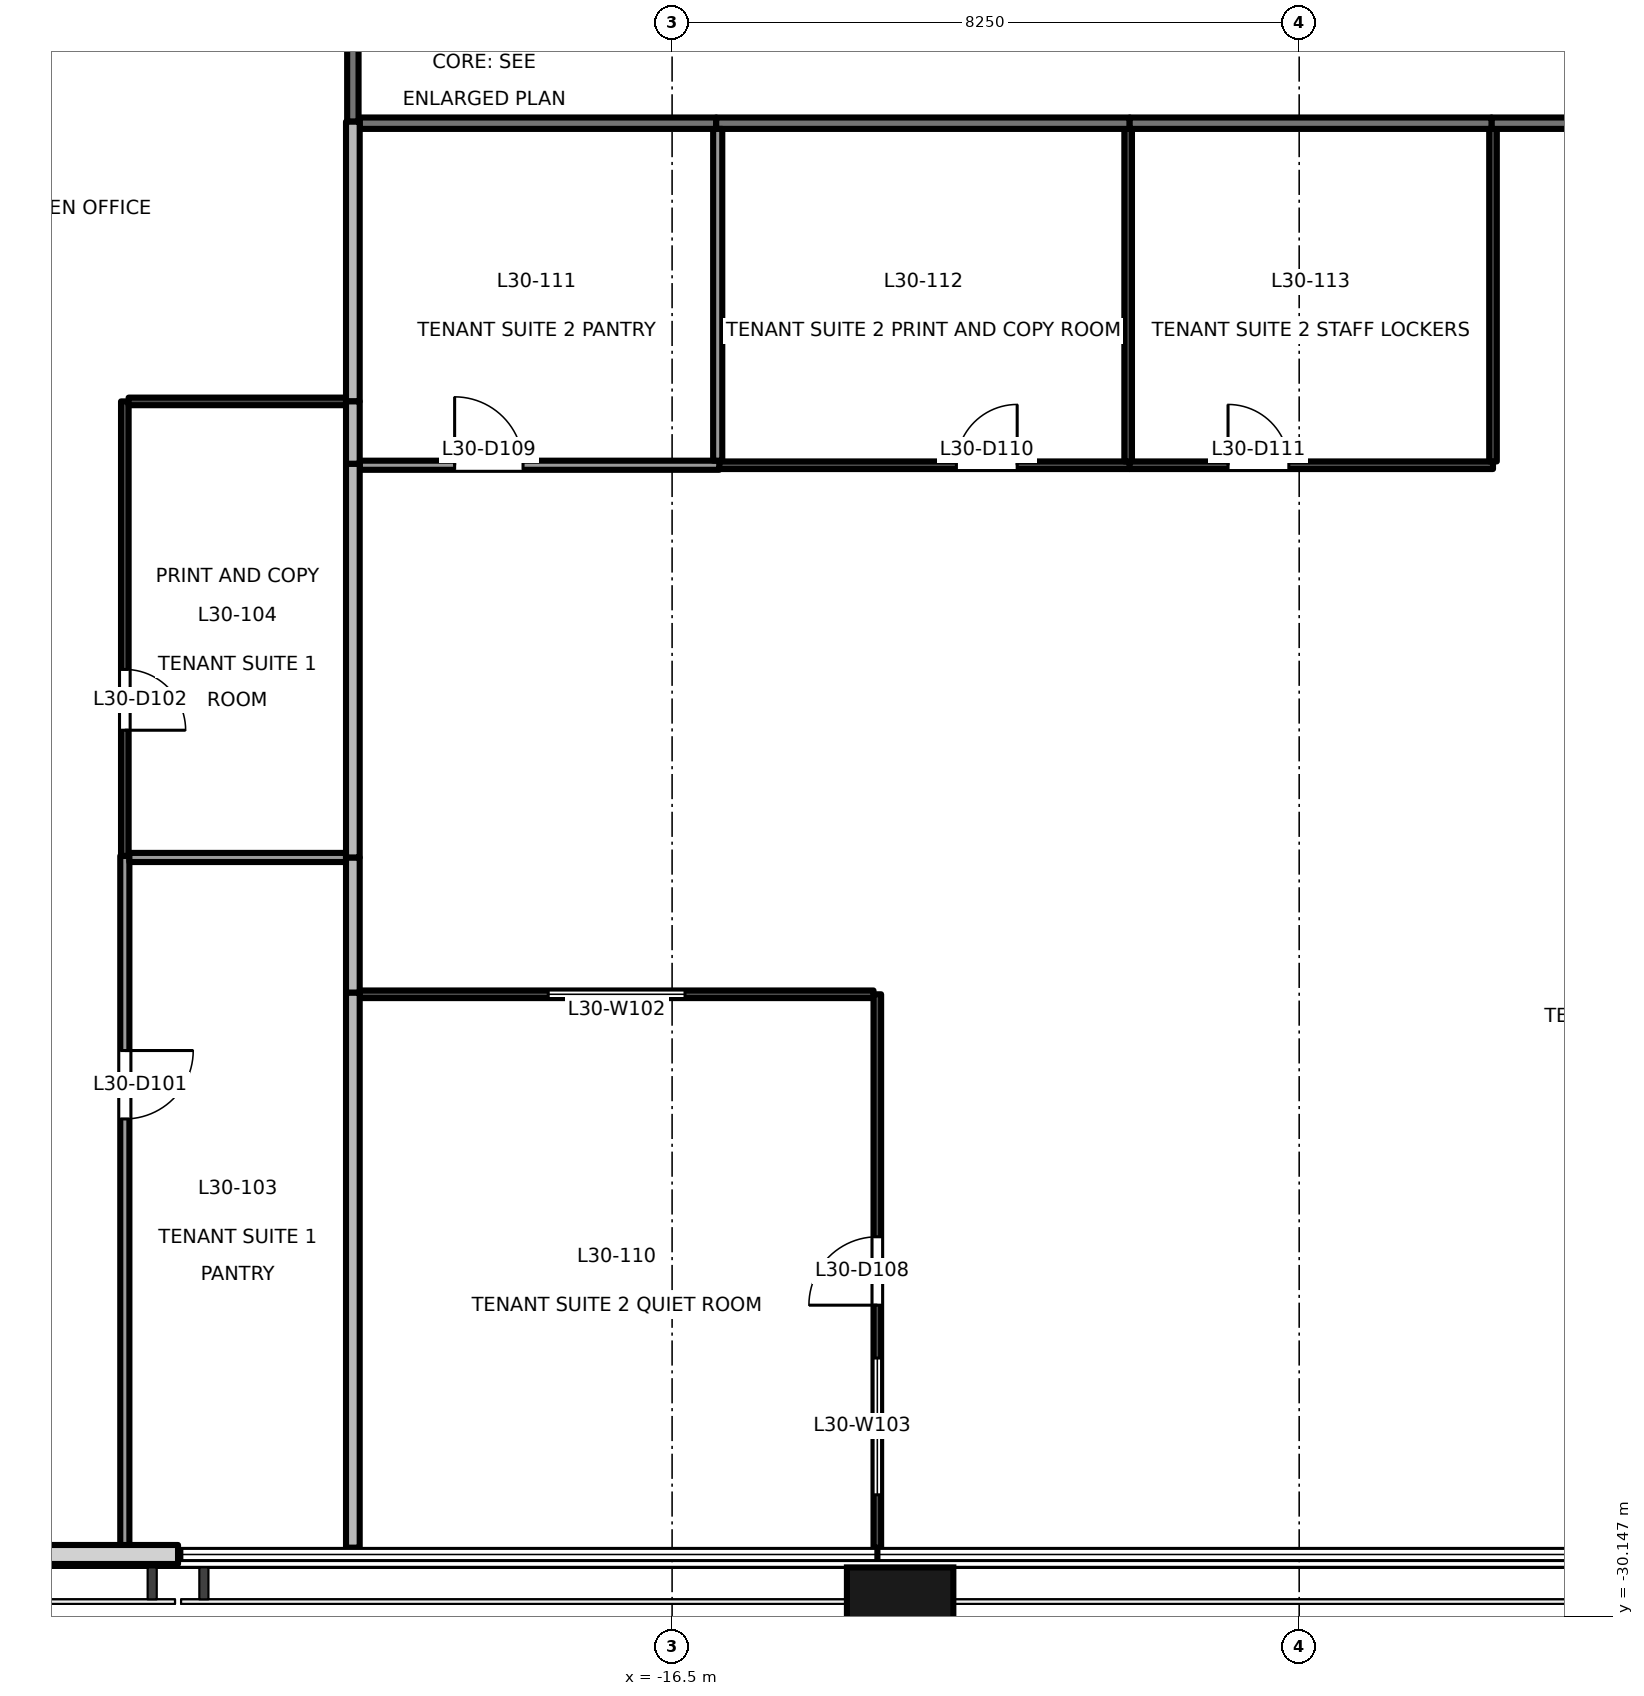
"""IFC4 building model, lengths in metres.
Left out: names, types, materials, properties, quantities, classifications, styles, units other than length and angle.
Written with IfcOpenShell. Run it as: python <this file> out.ifc"""

import sys

from ifc_helpers import new_model, si_unit, direction, frame, frame_2d, origin, origin_2d, place, context, subcontext, project, spatial, rectangle, extrude, element, fill, save


model = new_model("IFC4")
c1 = context("Model", 3, precision=1e-05, world=origin(), true_north=direction((0.0, 1.0)))
c2 = subcontext(c1, "Body", "Model", "MODEL_VIEW")
j1 = project(units=[si_unit("LENGTHUNIT", "METRE"), si_unit("PLANEANGLEUNIT", "RADIAN")], contexts=[c1])
p1 = place(None, origin())
s1 = spatial("IfcSite", under=j1, at=p1, CompositionType="ELEMENT")
p2 = place(p1, origin())
s2 = spatial("IfcBuilding", under=s1, at=p2, CompositionType="ELEMENT")
p3 = place(p2, frame((0.0, 0.0, 134.1)))
s3 = spatial("IfcBuildingStorey", under=s2, at=p3, CompositionType="ELEMENT", Elevation=134.1)
p4 = place(p3, frame((-13.5, -30.4, -0.2), z_axis=(0.0, 0.0, 1.0), x_axis=(1.0, 0.0, 0.0)))
e1 = element("IfcColumn", 1, at=p4, inside=s3, PredefinedType="COLUMN", context=c2, shape_type="SweptSolid", body=[
    extrude(rectangle(XDim=1.4, YDim=1.8, at=origin_2d()), origin(), (0.0, 0.0, 1.0), 4.0),
])
p5 = place(p3, frame((-25.955, -29.33, 0.0), z_axis=(0.0, 0.0, 1.0), x_axis=(1.0, 0.0, 0.0)))
e2 = element("IfcWall", 2, at=p5, inside=s3, PredefinedType="SOLIDWALL", context=c2, shape_type="SweptSolid", body=[
    extrude(rectangle(XDim=2.955, YDim=0.25, at=frame_2d((1.478, 0.0))), origin(), (0.0, 0.0, 1.0), 3.8),
])
p6 = place(p3, frame((-20.7, -10.48, 0.0), z_axis=(0.0, 0.0, 1.0), x_axis=(0.0, 1.0, 0.0)))
e3 = element("IfcWall", 3, at=p6, inside=s3, PredefinedType="PARTITIONING", context=c2, shape_type="SweptSolid", body=[
    extrude(rectangle(XDim=2.3, YDim=0.15, at=frame_2d((1.15, 0.0))), origin(), (0.0, 0.0, 1.0), 3.8),
])
p7 = place(p3, frame((0.32, -10.5, 0.0), z_axis=(0.0, 0.0, 1.0), x_axis=(-1.0, 0.0, 0.0)))
e4 = element("IfcWall", 4, at=p7, inside=s3, PredefinedType="PARTITIONING", context=c2, shape_type="SweptSolid", body=[
    extrude(rectangle(XDim=6.04, YDim=0.15, at=frame_2d((3.02, 0.0))), origin(), (0.0, 0.0, 1.0), 2.9),
])
p8 = place(p7, frame((2.12, 0.0, 0.0)))
e5 = element("IfcOpeningElement", 5, at=p8, cuts=e4, PredefinedType="OPENING", context=c2, shape_type="SweptSolid", body=[
    extrude(rectangle(XDim=1.8, YDim=2.1, at=frame_2d((0.9, 1.05))), frame((0.0, 0.085, 0.0), z_axis=(0.0, -1.0, 0.0), x_axis=(1.0, 0.0, 0.0)), (0.0, 0.0, 1.0), 0.171),
])
p9 = place(p3, frame((-15.92, -10.5, 0.0), z_axis=(0.0, 0.0, 1.0), x_axis=(-1.0, 0.0, 0.0)))
e6 = element("IfcWall", 6, at=p9, inside=s3, PredefinedType="PARTITIONING", context=c2, shape_type="SweptSolid", body=[
    extrude(rectangle(XDim=4.69, YDim=0.15, at=frame_2d((2.345, 0.0))), origin(), (0.0, 0.0, 1.0), 3.8),
])
p10 = place(p3, frame((-10.48, -10.5, 0.0), z_axis=(0.0, 0.0, 1.0), x_axis=(-1.0, 0.0, 0.0)))
e7 = element("IfcWall", 7, at=p10, inside=s3, PredefinedType="PARTITIONING", context=c2, shape_type="SweptSolid", body=[
    extrude(rectangle(XDim=5.44, YDim=0.15, at=frame_2d((2.72, 0.0))), origin(), (0.0, 0.0, 1.0), 2.9),
])
p11 = place(p3, frame((-5.72, -10.5, 0.0), z_axis=(0.0, 0.0, 1.0), x_axis=(-1.0, 0.0, 0.0)))
e8 = element("IfcWall", 8, at=p11, inside=s3, PredefinedType="PARTITIONING", context=c2, shape_type="SweptSolid", body=[
    extrude(rectangle(XDim=4.76, YDim=0.15, at=frame_2d((2.38, 0.0))), origin(), (0.0, 0.0, 1.0), 2.9),
])
p12 = place(p3, frame((-23.7, -20.14, 0.0), z_axis=(0.0, 0.0, 1.0), x_axis=(0.0, -1.0, 0.0)))
e9 = element("IfcWall", 9, at=p12, inside=s3, PredefinedType="PARTITIONING", context=c2, shape_type="SweptSolid", body=[
    extrude(rectangle(XDim=9.1, YDim=0.12, at=frame_2d((4.55, 0.0))), origin(), (0.0, 0.0, 1.0), 3.8),
])
p13 = place(p12, frame((2.56, 0.0, 0.0)))
e10 = element("IfcOpeningElement", 10, at=p13, cuts=e9, PredefinedType="OPENING", context=c2, shape_type="SweptSolid", body=[
    extrude(rectangle(XDim=0.9, YDim=2.1, at=frame_2d((0.45, 1.05))), frame((0.0, 0.071, 0.0), z_axis=(0.0, -1.0, 0.0), x_axis=(1.0, 0.0, 0.0)), (0.0, 0.0, 1.0), 0.141),
])
p14 = place(p3, frame((-23.7, -14.16, 0.0), z_axis=(0.0, 0.0, 1.0), x_axis=(0.0, -1.0, 0.0)))
e11 = element("IfcWall", 11, at=p14, inside=s3, PredefinedType="PARTITIONING", context=c2, shape_type="SweptSolid", body=[
    extrude(rectangle(XDim=5.98, YDim=0.1, at=frame_2d((2.99, 0.0))), origin(), (0.0, 0.0, 1.0), 3.8),
])
p15 = place(p14, frame((3.526, 0.0, 0.0)))
e12 = element("IfcOpeningElement", 12, at=p15, cuts=e11, PredefinedType="OPENING", context=c2, shape_type="SweptSolid", body=[
    extrude(rectangle(XDim=0.8, YDim=2.1, at=frame_2d((0.4, 1.05))), frame((0.0, 0.061, 0.0), z_axis=(0.0, -1.0, 0.0), x_axis=(1.0, 0.0, 0.0)), (0.0, 0.0, 1.0), 0.121),
])
p16 = place(p3, frame((-20.79, -14.16, 0.0), z_axis=(0.0, 0.0, 1.0), x_axis=(-1.0, 0.0, 0.0)))
e13 = element("IfcWall", 13, at=p16, inside=s3, PredefinedType="PARTITIONING", context=c2, shape_type="SweptSolid", body=[
    extrude(rectangle(XDim=2.86, YDim=0.1, at=frame_2d((1.43, 0.0))), origin(), (0.0, 0.0, 1.0), 3.8),
])
p17 = place(p3, frame((-20.7, -10.48, 0.0), z_axis=(0.0, 0.0, 1.0), x_axis=(0.0, -1.0, 0.0)))
e14 = element("IfcWall", 14, at=p17, inside=s3, PredefinedType="PARTITIONING", context=c2, shape_type="SweptSolid", body=[
    extrude(rectangle(XDim=3.68, YDim=0.18, at=frame_2d((1.84, 0.0))), origin(), (0.0, 0.0, 1.0), 3.8),
])
p18 = place(p3, frame((-23.64, -20.16, 0.0), z_axis=(0.0, 0.0, 1.0), x_axis=(1.0, 0.0, 0.0)))
e15 = element("IfcWall", 15, at=p18, inside=s3, PredefinedType="PARTITIONING", context=c2, shape_type="SweptSolid", body=[
    extrude(rectangle(XDim=2.85, YDim=0.12, at=frame_2d((1.425, 0.0))), origin(), (0.0, 0.0, 1.0), 3.8),
])
p19 = place(p3, frame((-20.7, -20.16, 0.0), z_axis=(0.0, 0.0, 1.0), x_axis=(0.0, -1.0, 0.0)))
e16 = element("IfcWall", 16, at=p19, inside=s3, PredefinedType="PARTITIONING", context=c2, shape_type="SweptSolid", body=[
    extrude(rectangle(XDim=1.78, YDim=0.18, at=frame_2d((0.89, 0.0))), origin(), (0.0, 0.0, 1.0), 3.8),
])
p20 = place(p3, frame((-20.7, -21.94, 0.0), z_axis=(0.0, 0.0, 1.0), x_axis=(0.0, -1.0, 0.0)))
e17 = element("IfcWall", 17, at=p20, inside=s3, PredefinedType="PARTITIONING", context=c2, shape_type="SweptSolid", body=[
    extrude(rectangle(XDim=7.3, YDim=0.18, at=frame_2d((3.65, 0.0))), origin(), (0.0, 0.0, 1.0), 3.8),
])
p21 = place(p3, frame((-20.7, -14.98, 0.0), z_axis=(0.0, 0.0, 1.0), x_axis=(0.0, -1.0, 0.0)))
e18 = element("IfcWall", 18, at=p21, inside=s3, PredefinedType="PARTITIONING", context=c2, shape_type="SweptSolid", body=[
    extrude(rectangle(XDim=5.18, YDim=0.18, at=frame_2d((2.59, 0.0))), origin(), (0.0, 0.0, 1.0), 3.8),
])
p22 = place(p3, frame((-20.7, -14.16, 0.0), z_axis=(0.0, 0.0, 1.0), x_axis=(0.0, -1.0, 0.0)))
e19 = element("IfcWall", 19, at=p22, inside=s3, PredefinedType="PARTITIONING", context=c2, shape_type="SweptSolid", body=[
    extrude(rectangle(XDim=0.82, YDim=0.18, at=frame_2d((0.41, 0.0))), origin(), (0.0, 0.0, 1.0), 3.8),
])
p23 = place(p3, frame((-13.85, -21.96, 0.0), z_axis=(0.0, 0.0, 1.0), x_axis=(-1.0, 0.0, 0.0)))
e20 = element("IfcWall", 20, at=p23, inside=s3, PredefinedType="PARTITIONING", context=c2, shape_type="SweptSolid", body=[
    extrude(rectangle(XDim=6.76, YDim=0.1, at=frame_2d((3.38, 0.0))), origin(), (0.0, 0.0, 1.0), 3.8),
])
p24 = place(p23, frame((2.48, 0.0, 0.9)))
e21 = element("IfcOpeningElement", 21, at=p24, cuts=e20, PredefinedType="OPENING", context=c2, shape_type="SweptSolid", body=[
    extrude(rectangle(XDim=1.8, YDim=1.2, at=frame_2d((0.9, 0.6))), frame((0.0, 0.061, 0.0), z_axis=(0.0, -1.0, 0.0), x_axis=(1.0, 0.0, 0.0)), (0.0, 0.0, 1.0), 0.121),
])
p25 = place(p3, frame((-13.8, -29.24, 0.0), z_axis=(0.0, 0.0, 1.0), x_axis=(0.0, 1.0, 0.0)))
e22 = element("IfcWall", 22, at=p25, inside=s3, PredefinedType="PARTITIONING", context=c2, shape_type="SweptSolid", body=[
    extrude(rectangle(XDim=7.28, YDim=0.1, at=frame_2d((3.64, 0.0))), origin(), (0.0, 0.0, 1.0), 3.8),
])
p26 = place(p25, frame((3.19, 0.0, 0.0)))
e23 = element("IfcOpeningElement", 23, at=p26, cuts=e22, PredefinedType="OPENING", context=c2, shape_type="SweptSolid", body=[
    extrude(rectangle(XDim=0.9, YDim=2.1, at=frame_2d((0.45, 1.05))), frame((0.0, 0.061, 0.0), z_axis=(0.0, -1.0, 0.0), x_axis=(1.0, 0.0, 0.0)), (0.0, 0.0, 1.0), 0.121),
])
p27 = place(p25, frame((0.695, 0.0, 0.9)))
e24 = element("IfcOpeningElement", 24, at=p27, cuts=e22, PredefinedType="OPENING", context=c2, shape_type="SweptSolid", body=[
    extrude(rectangle(XDim=1.8, YDim=1.2, at=frame_2d((0.9, 0.6))), frame((0.0, 0.061, 0.0), z_axis=(0.0, -1.0, 0.0), x_axis=(1.0, 0.0, 0.0)), (0.0, 0.0, 1.0), 0.121),
])
p28 = place(p3, frame((-20.61, -15.0, 0.0), z_axis=(0.0, 0.0, 1.0), x_axis=(1.0, 0.0, 0.0)))
e25 = element("IfcWall", 25, at=p28, inside=s3, PredefinedType="PARTITIONING", context=c2, shape_type="SweptSolid", body=[
    extrude(rectangle(XDim=4.73, YDim=0.12, at=frame_2d((2.365, 0.0))), origin(), (0.0, 0.0, 1.0), 3.8),
])
p29 = place(p28, frame((1.249, 0.0, 0.0)))
e26 = element("IfcOpeningElement", 26, at=p29, cuts=e25, PredefinedType="OPENING", context=c2, shape_type="SweptSolid", body=[
    extrude(rectangle(XDim=0.9, YDim=2.1, at=frame_2d((0.45, 1.05))), frame((0.0, 0.071, 0.0), z_axis=(0.0, -1.0, 0.0), x_axis=(1.0, 0.0, 0.0)), (0.0, 0.0, 1.0), 0.141),
])
p30 = place(p3, frame((-15.88, -15.0, 0.0), z_axis=(0.0, 0.0, 1.0), x_axis=(1.0, 0.0, 0.0)))
e27 = element("IfcWall", 27, at=p30, inside=s3, PredefinedType="PARTITIONING", context=c2, shape_type="SweptSolid", body=[
    extrude(rectangle(XDim=5.4, YDim=0.1, at=frame_2d((2.7, 0.0))), origin(), (0.0, 0.0, 1.0), 2.9),
])
p31 = place(p30, frame((3.12, 0.0, 0.0)))
e28 = element("IfcOpeningElement", 28, at=p31, cuts=e27, PredefinedType="OPENING", context=c2, shape_type="SweptSolid", body=[
    extrude(rectangle(XDim=0.8, YDim=2.1, at=frame_2d((0.4, 1.05))), frame((0.0, 0.061, 0.0), z_axis=(0.0, -1.0, 0.0), x_axis=(1.0, 0.0, 0.0)), (0.0, 0.0, 1.0), 0.121),
])
p32 = place(p3, frame((-10.48, -15.0, 0.0), z_axis=(0.0, 0.0, 1.0), x_axis=(1.0, 0.0, 0.0)))
e29 = element("IfcWall", 29, at=p32, inside=s3, PredefinedType="PARTITIONING", context=c2, shape_type="SweptSolid", body=[
    extrude(rectangle(XDim=4.78, YDim=0.1, at=frame_2d((2.39, 0.0))), origin(), (0.0, 0.0, 1.0), 2.9),
])
p33 = place(p32, frame((1.294, 0.0, 0.0)))
e30 = element("IfcOpeningElement", 30, at=p33, cuts=e29, PredefinedType="OPENING", context=c2, shape_type="SweptSolid", body=[
    extrude(rectangle(XDim=0.8, YDim=2.1, at=frame_2d((0.4, 1.05))), frame((0.0, 0.061, 0.0), z_axis=(0.0, -1.0, 0.0), x_axis=(1.0, 0.0, 0.0)), (0.0, 0.0, 1.0), 0.121),
])
p34 = place(p3, frame((-5.7, -14.95, 0.0), z_axis=(0.0, 0.0, 1.0), x_axis=(0.0, 1.0, 0.0)))
e31 = element("IfcWall", 31, at=p34, inside=s3, PredefinedType="PARTITIONING", context=c2, shape_type="SweptSolid", body=[
    extrude(rectangle(XDim=4.375, YDim=0.1, at=frame_2d((2.188, 0.0))), origin(), (0.0, 0.0, 1.0), 3.8),
])
p35 = place(p3, frame((-15.9, -10.575, 0.0), z_axis=(0.0, 0.0, 1.0), x_axis=(0.0, -1.0, 0.0)))
e32 = element("IfcWall", 32, at=p35, inside=s3, PredefinedType="PARTITIONING", context=c2, shape_type="SweptSolid", body=[
    extrude(rectangle(XDim=4.365, YDim=0.12, at=frame_2d((2.183, 0.0))), origin(), (0.0, 0.0, 1.0), 3.8),
])
p36 = place(p3, frame((-10.5, -10.575, 0.0), z_axis=(0.0, 0.0, 1.0), x_axis=(0.0, -1.0, 0.0)))
e33 = element("IfcWall", 33, at=p36, inside=s3, PredefinedType="PARTITIONING", context=c2, shape_type="SweptSolid", body=[
    extrude(rectangle(XDim=4.375, YDim=0.1, at=frame_2d((2.188, 0.0))), origin(), (0.0, 0.0, 1.0), 3.8),
])
p37 = place(p13, origin())
e34 = element("IfcDoor", 34, at=p37, inside=s3, OperationType="SINGLE_SWING_LEFT", PredefinedType="DOOR", context=c2, shape_type="SweptSolid", body=[
    extrude(rectangle(XDim=0.9, YDim=2.1, at=frame_2d((0.45, 1.05))), frame((0.0, 0.025, 0.0), z_axis=(0.0, -1.0, 0.0), x_axis=(1.0, 0.0, 0.0)), (0.0, 0.0, 1.0), 0.05),
])
fill(e10, e34)
p38 = place(p15, origin())
e35 = element("IfcDoor", 35, at=p38, inside=s3, OperationType="SINGLE_SWING_RIGHT", PredefinedType="DOOR", context=c2, shape_type="SweptSolid", body=[
    extrude(rectangle(XDim=0.8, YDim=2.1, at=frame_2d((0.4, 1.05))), frame((0.0, 0.025, 0.0), z_axis=(0.0, -1.0, 0.0), x_axis=(1.0, 0.0, 0.0)), (0.0, 0.0, 1.0), 0.05),
])
fill(e12, e35)
p39 = place(p26, origin())
e36 = element("IfcDoor", 36, at=p39, inside=s3, OperationType="SINGLE_SWING_LEFT", PredefinedType="DOOR", context=c2, shape_type="SweptSolid", body=[
    extrude(rectangle(XDim=0.9, YDim=2.1, at=frame_2d((0.45, 1.05))), frame((0.0, 0.025, 0.0), z_axis=(0.0, -1.0, 0.0), x_axis=(1.0, 0.0, 0.0)), (0.0, 0.0, 1.0), 0.05),
])
fill(e23, e36)
p40 = place(p29, origin())
e37 = element("IfcDoor", 37, at=p40, inside=s3, OperationType="SINGLE_SWING_LEFT", PredefinedType="DOOR", context=c2, shape_type="SweptSolid", body=[
    extrude(rectangle(XDim=0.9, YDim=2.1, at=frame_2d((0.45, 1.05))), frame((0.0, 0.025, 0.0), z_axis=(0.0, -1.0, 0.0), x_axis=(1.0, 0.0, 0.0)), (0.0, 0.0, 1.0), 0.05),
])
fill(e26, e37)
p41 = place(p31, origin())
e38 = element("IfcDoor", 38, at=p41, inside=s3, OperationType="SINGLE_SWING_RIGHT", PredefinedType="DOOR", context=c2, shape_type="SweptSolid", body=[
    extrude(rectangle(XDim=0.8, YDim=2.1, at=frame_2d((0.4, 1.05))), frame((0.0, 0.025, 0.0), z_axis=(0.0, -1.0, 0.0), x_axis=(1.0, 0.0, 0.0)), (0.0, 0.0, 1.0), 0.05),
])
fill(e28, e38)
p42 = place(p33, origin())
e39 = element("IfcDoor", 39, at=p42, inside=s3, OperationType="SINGLE_SWING_LEFT", PredefinedType="DOOR", context=c2, shape_type="SweptSolid", body=[
    extrude(rectangle(XDim=0.8, YDim=2.1, at=frame_2d((0.4, 1.05))), frame((0.0, 0.025, 0.0), z_axis=(0.0, -1.0, 0.0), x_axis=(1.0, 0.0, 0.0)), (0.0, 0.0, 1.0), 0.05),
])
fill(e30, e39)
p43 = place(p24, origin())
e40 = element("IfcWindow", 40, at=p43, inside=s3, PartitioningType="SINGLE_PANEL", PredefinedType="WINDOW", context=c2, shape_type="SweptSolid", body=[
    extrude(rectangle(XDim=1.8, YDim=1.2, at=frame_2d((0.9, 0.6))), frame((0.0, 0.03, 0.0), z_axis=(0.0, -1.0, 0.0), x_axis=(1.0, 0.0, 0.0)), (0.0, 0.0, 1.0), 0.06),
])
fill(e21, e40)
p44 = place(p27, origin())
e41 = element("IfcWindow", 41, at=p44, inside=s3, PartitioningType="SINGLE_PANEL", PredefinedType="WINDOW", context=c2, shape_type="SweptSolid", body=[
    extrude(rectangle(XDim=1.8, YDim=1.2, at=frame_2d((0.9, 0.6))), frame((0.0, 0.03, 0.0), z_axis=(0.0, -1.0, 0.0), x_axis=(1.0, 0.0, 0.0)), (0.0, 0.0, 1.0), 0.06),
])
fill(e24, e41)
save(model, sys.argv[1])
